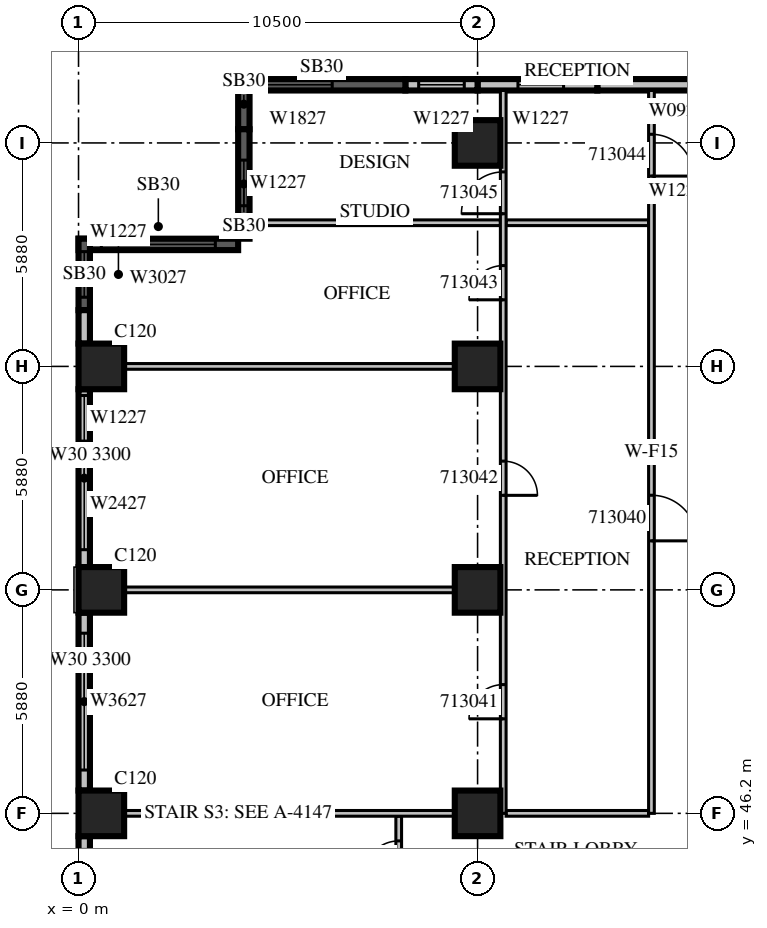
"""IFC4 building model, lengths in metres.
Left out: names, types, materials, properties, quantities, classifications, styles, units other than length and angle.
Written with IfcOpenShell. Run it as: python <this file> out.ifc"""

import sys

from ifc_helpers import new_model, si_unit, direction, frame, frame_2d, origin, origin_2d, place, context, subcontext, project, spatial, rectangle, extrude, source, transform, mapped, element, fill, save


model = new_model("IFC4")
c1 = context("Model", 3, precision=1e-05, world=origin(), true_north=direction((0.0, 1.0)))
c2 = subcontext(c1, "Body", "Model", "MODEL_VIEW")
j1 = project(units=[si_unit("LENGTHUNIT", "METRE"), si_unit("PLANEANGLEUNIT", "RADIAN")], contexts=[c1])
p1 = place(None, origin())
s1 = spatial("IfcSite", under=j1, at=p1, CompositionType="ELEMENT")
p2 = place(p1, origin())
s2 = spatial("IfcBuilding", under=s1, at=p2, CompositionType="ELEMENT")
p3 = place(p2, frame((0.0, 0.0, 65.7)))
s3 = spatial("IfcBuildingStorey", under=s2, at=p3, CompositionType="ELEMENT", Elevation=65.7)
m1 = source(origin(), c2, "Body", "SweptSolid", [
    extrude(rectangle(XDim=1.2, YDim=1.2, at=origin_2d()), origin(), (0.0, 0.0, 1.0), 4.2),
])
for number, where, z_axis, x_axis in (
    (1, (0.6, 46.2, 0.0), (0.0, 0.0, 1.0), (1.0, 0.0, 0.0)),
    (2, (10.5, 46.2, 0.0), (0.0, 0.0, 1.0), (1.0, 0.0, 0.0)),
    (3, (0.6, 52.08, 0.0), (0.0, 0.0, 1.0), (1.0, 0.0, 0.0)),
    (4, (10.5, 52.08, 0.0), (0.0, 0.0, 1.0), (1.0, 0.0, 0.0)),
    (5, (0.6, 57.96, 0.0), (0.0, 0.0, 1.0), (1.0, 0.0, 0.0)),
    (6, (10.5, 57.96, 0.0), (0.0, 0.0, 1.0), (1.0, 0.0, 0.0)),
    (7, (10.5, 63.84, 0.0), (0.0, 0.0, 1.0), (1.0, 0.0, 0.0)),
):
    element("IfcColumn", number, at=place(p3, frame(where, z_axis=z_axis, x_axis=x_axis)), inside=s3, PredefinedType="COLUMN", context=c2, shape_type="MappedRepresentation", body=[
        mapped(m1, transform((0.0, 0.0, 0.0), scale=1.0)),
    ])
m2 = source(origin(), c2, "Body", "SweptSolid", [
    extrude(rectangle(XDim=3.15, YDim=0.3, at=frame_2d((1.575, 0.0))), origin(), (0.0, 0.0, 1.0), 3.8),
])
p4 = place(p3, frame((16.8, 65.37, 0.0), z_axis=(0.0, 0.0, 1.0), x_axis=(-1.0, 0.0, 0.0)))
e8 = element("IfcWall", 8, at=p4, inside=s3, PredefinedType="STANDARD", context=c2, shape_type="MappedRepresentation", body=[
    mapped(m2, transform((0.0, 0.0, 0.0), scale=1.0)),
])
p5 = place(p3, frame((13.65, 65.37, 0.0), z_axis=(0.0, 0.0, 1.0), x_axis=(-1.0, 0.0, 0.0)))
e9 = element("IfcWall", 9, at=p5, inside=s3, PredefinedType="STANDARD", context=c2, shape_type="MappedRepresentation", body=[
    mapped(m2, transform((0.0, 0.0, 0.0), scale=1.0)),
])
m3 = source(origin(), c2, "Body", "SweptSolid", [
    extrude(rectangle(XDim=1.2, YDim=2.7, at=frame_2d((0.6, 1.35))), frame((0.0, 0.16, 0.0), z_axis=(0.0, -1.0, 0.0), x_axis=(1.0, 0.0, 0.0)), (0.0, 0.0, 1.0), 0.32),
])
p6 = place(p5, frame((0.887, 0.0, 0.6)))
e10 = element("IfcOpeningElement", 10, at=p6, cuts=e9, PredefinedType="OPENING", context=c2, shape_type="MappedRepresentation", body=[
    mapped(m3, transform((0.0, 0.0, 0.0), scale=1.0)),
])
p7 = place(p3, frame((10.5, 65.37, 0.0), z_axis=(0.0, 0.0, 1.0), x_axis=(-1.0, 0.0, 0.0)))
e11 = element("IfcWall", 11, at=p7, inside=s3, PredefinedType="STANDARD", context=c2, shape_type="SweptSolid", body=[
    extrude(rectangle(XDim=1.9, YDim=0.3, at=frame_2d((0.95, 0.0))), origin(), (0.0, 0.0, 1.0), 3.8),
])
p8 = place(p7, frame((0.35, 0.0, 0.6)))
e12 = element("IfcOpeningElement", 12, at=p8, cuts=e11, PredefinedType="OPENING", context=c2, shape_type="MappedRepresentation", body=[
    mapped(m3, transform((0.0, 0.0, 0.0), scale=1.0)),
])
p9 = place(p3, frame((8.6, 65.37, 0.0), z_axis=(0.0, 0.0, 1.0), x_axis=(-1.0, 0.0, 0.0)))
e13 = element("IfcWall", 13, at=p9, inside=s3, PredefinedType="SOLIDWALL", context=c2, shape_type="SweptSolid", body=[
    extrude(rectangle(XDim=4.4, YDim=0.3, at=frame_2d((2.2, 0.0))), origin(), (0.0, 0.0, 1.0), 3.8),
])
m4 = source(origin(), c2, "Body", "SweptSolid", [
    extrude(rectangle(XDim=1.8, YDim=2.7, at=frame_2d((0.9, 1.35))), frame((0.0, 0.16, 0.0), z_axis=(0.0, -1.0, 0.0), x_axis=(1.0, 0.0, 0.0)), (0.0, 0.0, 1.0), 0.32),
])
p10 = place(p9, frame((1.925, 0.0, 0.6)))
e14 = element("IfcOpeningElement", 14, at=p10, cuts=e13, PredefinedType="OPENING", context=c2, shape_type="MappedRepresentation", body=[
    mapped(m4, transform((0.0, 0.0, 0.0), scale=1.0)),
])
p11 = place(p3, frame((4.35, 65.52, 0.0), z_axis=(0.0, 0.0, 1.0), x_axis=(0.0, -1.0, 0.0)))
e15 = element("IfcWall", 15, at=p11, inside=s3, PredefinedType="SOLIDWALL", context=c2, shape_type="SweptSolid", body=[
    extrude(rectangle(XDim=1.32, YDim=0.3, at=frame_2d((0.66, 0.0))), origin(), (0.0, 0.0, 1.0), 3.8),
])
p12 = place(p3, frame((4.35, 64.2, 0.0), z_axis=(0.0, 0.0, 1.0), x_axis=(0.0, -1.0, 0.0)))
e16 = element("IfcWall", 16, at=p12, inside=s3, PredefinedType="SOLIDWALL", context=c2, shape_type="SweptSolid", body=[
    extrude(rectangle(XDim=2.88, YDim=0.3, at=frame_2d((1.44, 0.0))), origin(), (0.0, 0.0, 1.0), 3.8),
])
p13 = place(p12, frame((0.812, 0.0, 0.6)))
e17 = element("IfcOpeningElement", 17, at=p13, cuts=e16, PredefinedType="OPENING", context=c2, shape_type="MappedRepresentation", body=[
    mapped(m3, transform((0.0, 0.0, 0.0), scale=1.0)),
])
m5 = source(origin(), c2, "Body", "SweptSolid", [
    extrude(rectangle(XDim=4.2, YDim=0.3, at=frame_2d((2.1, 0.0))), origin(), (0.0, 0.0, 1.0), 3.8),
])
p14 = place(p3, frame((4.2, 61.17, 0.0), z_axis=(0.0, 0.0, 1.0), x_axis=(-1.0, 0.0, 0.0)))
e18 = element("IfcWall", 18, at=p14, inside=s3, PredefinedType="SOLIDWALL", context=c2, shape_type="MappedRepresentation", body=[
    mapped(m5, transform((0.0, 0.0, 0.0), scale=1.0)),
])
m6 = source(origin(), c2, "Body", "SweptSolid", [
    extrude(rectangle(XDim=3.0, YDim=2.7, at=frame_2d((1.5, 1.35))), frame((0.0, 0.16, 0.0), z_axis=(0.0, -1.0, 0.0), x_axis=(1.0, 0.0, 0.0)), (0.0, 0.0, 1.0), 0.32),
])
p15 = place(p14, frame((0.6, 0.0, 0.6)))
e19 = element("IfcOpeningElement", 19, at=p15, cuts=e18, PredefinedType="OPENING", context=c2, shape_type="MappedRepresentation", body=[
    mapped(m6, transform((0.0, 0.0, 0.0), scale=1.0)),
])
p16 = place(p3, frame((0.15, 61.32, 0.0), z_axis=(0.0, 0.0, 1.0), x_axis=(0.0, -1.0, 0.0)))
e20 = element("IfcWall", 20, at=p16, inside=s3, PredefinedType="SOLIDWALL", context=c2, shape_type="SweptSolid", body=[
    extrude(rectangle(XDim=1.88, YDim=0.3, at=frame_2d((0.94, 0.0))), origin(), (0.0, 0.0, 1.0), 3.8),
])
p17 = place(p16, frame((0.34, 0.0, 0.6)))
e21 = element("IfcOpeningElement", 21, at=p17, cuts=e20, PredefinedType="OPENING", context=c2, shape_type="MappedRepresentation", body=[
    mapped(m3, transform((0.0, 0.0, 0.0), scale=1.0)),
])
p18 = place(p3, frame((0.15, 59.44, 0.0), z_axis=(0.0, 0.0, 1.0), x_axis=(0.0, -1.0, 0.0)))
e22 = element("IfcWall", 22, at=p18, inside=s3, PredefinedType="STANDARD", context=c2, shape_type="SweptSolid", body=[
    extrude(rectangle(XDim=0.88, YDim=0.3, at=frame_2d((0.44, 0.0))), origin(), (0.0, 0.0, 1.0), 3.8),
])
m7 = source(origin(), c2, "Body", "SweptSolid", [
    extrude(rectangle(XDim=4.68, YDim=0.3, at=frame_2d((2.34, 0.0))), origin(), (0.0, 0.0, 1.0), 3.3),
])
p19 = place(p3, frame((0.15, 57.36, 0.0), z_axis=(0.0, 0.0, 1.0), x_axis=(0.0, -1.0, 0.0)))
e23 = element("IfcWall", 23, at=p19, inside=s3, PredefinedType="STANDARD", context=c2, shape_type="MappedRepresentation", body=[
    mapped(m7, transform((0.0, 0.0, 0.0), scale=1.0)),
])
p20 = place(p19, frame((0.165, 0.0, 0.6)))
e24 = element("IfcOpeningElement", 24, at=p20, cuts=e23, PredefinedType="OPENING", context=c2, shape_type="MappedRepresentation", body=[
    mapped(m3, transform((0.0, 0.0, 0.0), scale=1.0)),
])
m8 = source(origin(), c2, "Body", "SweptSolid", [
    extrude(rectangle(XDim=2.4, YDim=2.7, at=frame_2d((1.2, 1.35))), frame((0.0, 0.16, 0.0), z_axis=(0.0, -1.0, 0.0), x_axis=(1.0, 0.0, 0.0)), (0.0, 0.0, 1.0), 0.32),
])
p21 = place(p19, frame((1.823, 0.0, 0.6)))
e25 = element("IfcOpeningElement", 25, at=p21, cuts=e23, PredefinedType="OPENING", context=c2, shape_type="MappedRepresentation", body=[
    mapped(m8, transform((0.0, 0.0, 0.0), scale=1.0)),
])
p22 = place(p3, frame((0.15, 51.48, 0.0), z_axis=(0.0, 0.0, 1.0), x_axis=(0.0, -1.0, 0.0)))
e26 = element("IfcWall", 26, at=p22, inside=s3, PredefinedType="STANDARD", context=c2, shape_type="MappedRepresentation", body=[
    mapped(m7, transform((0.0, 0.0, 0.0), scale=1.0)),
])
m9 = source(origin(), c2, "Body", "SweptSolid", [
    extrude(rectangle(XDim=3.6, YDim=2.7, at=frame_2d((1.8, 1.35))), frame((0.0, 0.16, 0.0), z_axis=(0.0, -1.0, 0.0), x_axis=(1.0, 0.0, 0.0)), (0.0, 0.0, 1.0), 0.32),
])
p23 = place(p22, frame((0.54, 0.0, 0.6)))
e27 = element("IfcOpeningElement", 27, at=p23, cuts=e26, PredefinedType="OPENING", context=c2, shape_type="MappedRepresentation", body=[
    mapped(m9, transform((0.0, 0.0, 0.0), scale=1.0)),
])
m10 = source(origin(), c2, "Body", "SweptSolid", [
    extrude(rectangle(XDim=1.6, YDim=0.3, at=frame_2d((0.8, 0.0))), origin(), (0.0, 0.0, 1.0), 3.8),
])
p24 = place(p3, frame((0.15, 45.6, 0.0), z_axis=(0.0, 0.0, 1.0), x_axis=(0.0, -1.0, 0.0)))
e28 = element("IfcWall", 28, at=p24, inside=s3, PredefinedType="STANDARD", context=c2, shape_type="MappedRepresentation", body=[
    mapped(m10, transform((0.0, 0.0, 0.0), scale=1.0)),
])
m11 = source(origin(), c2, "Body", "SweptSolid", [
    extrude(rectangle(XDim=0.9, YDim=2.7, at=frame_2d((0.45, 1.35))), frame((0.0, 0.16, 0.0), z_axis=(0.0, -1.0, 0.0), x_axis=(1.0, 0.0, 0.0)), (0.0, 0.0, 1.0), 0.32),
])
p25 = place(p24, frame((0.35, 0.0, 0.6)))
e29 = element("IfcOpeningElement", 29, at=p25, cuts=e28, PredefinedType="OPENING", context=c2, shape_type="MappedRepresentation", body=[
    mapped(m11, transform((0.0, 0.0, 0.0), scale=1.0)),
])
m12 = source(origin(), c2, "Body", "SweptSolid", [
    extrude(rectangle(XDim=2.2, YDim=0.15, at=frame_2d((1.1, 0.0))), origin(), (0.0, 0.0, 1.0), 3.8),
])
p26 = place(p3, frame((8.425, 43.925, 0.0), z_axis=(0.0, 0.0, 1.0), x_axis=(0.0, 1.0, 0.0)))
e30 = element("IfcWall", 30, at=p26, inside=s3, PredefinedType="PARTITIONING", context=c2, shape_type="MappedRepresentation", body=[
    mapped(m12, transform((0.0, 0.0, 0.0), scale=1.0)),
])
m13 = source(origin(), c2, "Body", "SweptSolid", [
    extrude(rectangle(XDim=0.9, YDim=2.1, at=frame_2d((0.45, 1.05))), frame((0.0, 0.085, 0.0), z_axis=(0.0, -1.0, 0.0), x_axis=(1.0, 0.0, 0.0)), (0.0, 0.0, 1.0), 0.17),
])
p27 = place(p26, frame((0.65, 0.0, 0.0)))
e31 = element("IfcOpeningElement", 31, at=p27, cuts=e30, PredefinedType="OPENING", context=c2, shape_type="MappedRepresentation", body=[
    mapped(m13, transform((0.0, 0.0, 0.0), scale=1.0)),
])
m14 = source(origin(), c2, "Body", "SweptSolid", [
    extrude(rectangle(XDim=8.702, YDim=0.15, at=frame_2d((4.351, 0.0))), origin(), (0.0, 0.0, 1.0), 3.8),
])
for number, where, z_axis, x_axis in (
    (32, (9.901, 52.08, 0.0), (0.0, 0.0, 1.0), (-1.0, 0.0, 0.0)),
    (33, (9.901, 57.96, 0.0), (0.0, 0.0, 1.0), (-1.0, 0.0, 0.0)),
    (34, (9.901, 46.2, 0.0), (0.0, 0.0, 1.0), (-1.0, 0.0, 0.0)),
):
    element("IfcWall", number, at=place(p3, frame(where, z_axis=z_axis, x_axis=x_axis)), inside=s3, PredefinedType="PARTITIONING", context=c2, shape_type="MappedRepresentation", body=[
        mapped(m14, transform((0.0, 0.0, 0.0), scale=1.0)),
    ])
m15 = source(origin(), c2, "Body", "SweptSolid", [
    extrude(rectangle(XDim=3.75, YDim=0.15, at=frame_2d((1.875, 0.0))), origin(), (0.0, 0.0, 1.0), 3.8),
])
p28 = place(p3, frame((15.0, 46.2, 0.0), z_axis=(0.0, 0.0, 1.0), x_axis=(-1.0, 0.0, 0.0)))
e35 = element("IfcWall", 35, at=p28, inside=s3, PredefinedType="PARTITIONING", context=c2, shape_type="MappedRepresentation", body=[
    mapped(m15, transform((0.0, 0.0, 0.0), scale=1.0)),
])
m16 = source(origin(), c2, "Body", "SweptSolid", [
    extrude(rectangle(XDim=6.695, YDim=0.15, at=frame_2d((3.348, 0.0))), origin(), (0.0, 0.0, 1.0), 3.8),
])
p29 = place(p3, frame((11.1, 61.74, 0.0), z_axis=(0.0, 0.0, 1.0), x_axis=(-1.0, 0.0, 0.0)))
e36 = element("IfcWall", 36, at=p29, inside=s3, PredefinedType="PARTITIONING", context=c2, shape_type="MappedRepresentation", body=[
    mapped(m16, transform((0.0, 0.0, 0.0), scale=1.0)),
])
p30 = place(p3, frame((15.0, 61.74, 0.0), z_axis=(0.0, 0.0, 1.0), x_axis=(-1.0, 0.0, 0.0)))
e37 = element("IfcWall", 37, at=p30, inside=s3, PredefinedType="PARTITIONING", context=c2, shape_type="MappedRepresentation", body=[
    mapped(m15, transform((0.0, 0.0, 0.0), scale=1.0)),
])
m17 = source(origin(), c2, "Body", "SweptSolid", [
    extrude(rectangle(XDim=19.02, YDim=0.15, at=frame_2d((9.51, 0.0))), origin(), (0.0, 0.0, 1.0), 3.8),
])
p31 = place(p3, frame((11.175, 46.2, 0.0), z_axis=(0.0, 0.0, 1.0), x_axis=(0.0, 1.0, 0.0)))
e38 = element("IfcWall", 38, at=p31, inside=s3, PredefinedType="PARTITIONING", context=c2, shape_type="MappedRepresentation", body=[
    mapped(m17, transform((0.0, 0.0, 0.0), scale=1.0)),
])
p32 = place(p31, frame((2.487, 0.0, 0.0)))
e39 = element("IfcOpeningElement", 39, at=p32, cuts=e38, PredefinedType="OPENING", context=c2, shape_type="MappedRepresentation", body=[
    mapped(m13, transform((0.0, 0.0, 0.0), scale=1.0)),
])
p33 = place(p31, frame((8.367, 0.0, 0.0)))
e40 = element("IfcOpeningElement", 40, at=p33, cuts=e38, PredefinedType="OPENING", context=c2, shape_type="MappedRepresentation", body=[
    mapped(m13, transform((0.0, 0.0, 0.0), scale=1.0)),
])
p34 = place(p31, frame((13.512, 0.0, 0.0)))
e41 = element("IfcOpeningElement", 41, at=p34, cuts=e38, PredefinedType="OPENING", context=c2, shape_type="MappedRepresentation", body=[
    mapped(m13, transform((0.0, 0.0, 0.0), scale=1.0)),
])
m18 = source(origin(), c2, "Body", "SweptSolid", [
    extrude(rectangle(XDim=1.1, YDim=2.1, at=frame_2d((0.55, 1.05))), frame((0.0, 0.085, 0.0), z_axis=(0.0, -1.0, 0.0), x_axis=(1.0, 0.0, 0.0)), (0.0, 0.0, 1.0), 0.17),
])
p35 = place(p31, frame((15.777, 0.0, 0.0)))
e42 = element("IfcOpeningElement", 42, at=p35, cuts=e38, PredefinedType="OPENING", context=c2, shape_type="MappedRepresentation", body=[
    mapped(m18, transform((0.0, 0.0, 0.0), scale=1.0)),
])
p36 = place(p3, frame((15.075, 46.2, 0.0), z_axis=(0.0, 0.0, 1.0), x_axis=(0.0, 1.0, 0.0)))
e43 = element("IfcWall", 43, at=p36, inside=s3, PredefinedType="PARTITIONING", context=c2, shape_type="MappedRepresentation", body=[
    mapped(m17, transform((0.0, 0.0, 0.0), scale=1.0)),
])
m19 = source(origin(), c2, "Body", "SweptSolid", [
    extrude(rectangle(XDim=1.2, YDim=2.1, at=frame_2d((0.6, 1.05))), frame((0.0, 0.085, 0.0), z_axis=(0.0, -1.0, 0.0), x_axis=(1.0, 0.0, 0.0)), (0.0, 0.0, 1.0), 0.17),
])
p37 = place(p36, frame((7.17, 0.0, 0.0)))
e44 = element("IfcOpeningElement", 44, at=p37, cuts=e43, PredefinedType="OPENING", context=c2, shape_type="MappedRepresentation", body=[
    mapped(m19, transform((0.0, 0.0, 0.0), scale=1.0)),
])
p38 = place(p36, frame((16.767, 0.0, 0.0)))
e45 = element("IfcOpeningElement", 45, at=p38, cuts=e43, PredefinedType="OPENING", context=c2, shape_type="MappedRepresentation", body=[
    mapped(m18, transform((0.0, 0.0, 0.0), scale=1.0)),
])
m20 = source(origin(), c2, "Body", "SweptSolid", [
    extrude(rectangle(XDim=1.2, YDim=2.7, at=frame_2d((0.6, 1.35))), frame((0.0, 0.03, 0.0), z_axis=(0.0, -1.0, 0.0), x_axis=(1.0, 0.0, 0.0)), (0.0, 0.0, 1.0), 0.06),
])
p39 = place(p6, origin())
e46 = element("IfcWindow", 46, at=p39, inside=s3, PartitioningType="SINGLE_PANEL", PredefinedType="WINDOW", context=c2, shape_type="MappedRepresentation", body=[
    mapped(m20, transform((0.0, 0.0, 0.0), scale=1.0)),
])
fill(e10, e46)
m21 = source(origin(), c2, "Body", "SweptSolid", [
    extrude(rectangle(XDim=1.8, YDim=2.7, at=frame_2d((0.9, 1.35))), frame((0.0, 0.03, 0.0), z_axis=(0.0, -1.0, 0.0), x_axis=(1.0, 0.0, 0.0)), (0.0, 0.0, 1.0), 0.06),
])
p40 = place(p10, origin())
e47 = element("IfcWindow", 47, at=p40, inside=s3, PartitioningType="SINGLE_PANEL", PredefinedType="WINDOW", context=c2, shape_type="MappedRepresentation", body=[
    mapped(m21, transform((0.0, 0.0, 0.0), scale=1.0)),
])
fill(e14, e47)
p41 = place(p8, origin())
e48 = element("IfcWindow", 48, at=p41, inside=s3, PartitioningType="SINGLE_PANEL", PredefinedType="WINDOW", context=c2, shape_type="MappedRepresentation", body=[
    mapped(m20, transform((0.0, 0.0, 0.0), scale=1.0)),
])
fill(e12, e48)
p42 = place(p13, origin())
e49 = element("IfcWindow", 49, at=p42, inside=s3, PartitioningType="SINGLE_PANEL", PredefinedType="WINDOW", context=c2, shape_type="MappedRepresentation", body=[
    mapped(m20, transform((0.0, 0.0, 0.0), scale=1.0)),
])
fill(e17, e49)
m22 = source(origin(), c2, "Body", "SweptSolid", [
    extrude(rectangle(XDim=3.0, YDim=2.7, at=frame_2d((1.5, 1.35))), frame((0.0, 0.03, 0.0), z_axis=(0.0, -1.0, 0.0), x_axis=(1.0, 0.0, 0.0)), (0.0, 0.0, 1.0), 0.06),
])
p43 = place(p15, origin())
e50 = element("IfcWindow", 50, at=p43, inside=s3, PartitioningType="SINGLE_PANEL", PredefinedType="WINDOW", context=c2, shape_type="MappedRepresentation", body=[
    mapped(m22, transform((0.0, 0.0, 0.0), scale=1.0)),
])
fill(e19, e50)
p44 = place(p20, origin())
e51 = element("IfcWindow", 51, at=p44, inside=s3, PartitioningType="SINGLE_PANEL", PredefinedType="WINDOW", context=c2, shape_type="MappedRepresentation", body=[
    mapped(m20, transform((0.0, 0.0, 0.0), scale=1.0)),
])
fill(e24, e51)
m23 = source(origin(), c2, "Body", "SweptSolid", [
    extrude(rectangle(XDim=2.4, YDim=2.7, at=frame_2d((1.2, 1.35))), frame((0.0, 0.03, 0.0), z_axis=(0.0, -1.0, 0.0), x_axis=(1.0, 0.0, 0.0)), (0.0, 0.0, 1.0), 0.06),
])
p45 = place(p21, origin())
e52 = element("IfcWindow", 52, at=p45, inside=s3, PartitioningType="SINGLE_PANEL", PredefinedType="WINDOW", context=c2, shape_type="MappedRepresentation", body=[
    mapped(m23, transform((0.0, 0.0, 0.0), scale=1.0)),
])
fill(e25, e52)
p46 = place(p17, origin())
e53 = element("IfcWindow", 53, at=p46, inside=s3, PartitioningType="SINGLE_PANEL", PredefinedType="WINDOW", context=c2, shape_type="MappedRepresentation", body=[
    mapped(m20, transform((0.0, 0.0, 0.0), scale=1.0)),
])
fill(e21, e53)
m24 = source(origin(), c2, "Body", "SweptSolid", [
    extrude(rectangle(XDim=3.6, YDim=2.7, at=frame_2d((1.8, 1.35))), frame((0.0, 0.03, 0.0), z_axis=(0.0, -1.0, 0.0), x_axis=(1.0, 0.0, 0.0)), (0.0, 0.0, 1.0), 0.06),
])
p47 = place(p23, origin())
e54 = element("IfcWindow", 54, at=p47, inside=s3, PartitioningType="SINGLE_PANEL", PredefinedType="WINDOW", context=c2, shape_type="MappedRepresentation", body=[
    mapped(m24, transform((0.0, 0.0, 0.0), scale=1.0)),
])
fill(e27, e54)
m25 = source(origin(), c2, "Body", "SweptSolid", [
    extrude(rectangle(XDim=0.9, YDim=2.1, at=frame_2d((0.45, 1.05))), frame((0.0, 0.025, 0.0), z_axis=(0.0, -1.0, 0.0), x_axis=(1.0, 0.0, 0.0)), (0.0, 0.0, 1.0), 0.05),
])
p48 = place(p27, origin())
e55 = element("IfcDoor", 55, at=p48, inside=s3, OperationType="SINGLE_SWING_LEFT", PredefinedType="DOOR", context=c2, shape_type="MappedRepresentation", body=[
    mapped(m25, transform((0.0, 0.0, 0.0), scale=1.0)),
])
fill(e31, e55)
m26 = source(origin(), c2, "Body", "SweptSolid", [
    extrude(rectangle(XDim=1.2, YDim=2.1, at=frame_2d((0.6, 1.05))), frame((0.0, 0.025, 0.0), z_axis=(0.0, -1.0, 0.0), x_axis=(1.0, 0.0, 0.0)), (0.0, 0.0, 1.0), 0.05),
])
p49 = place(p37, origin())
e56 = element("IfcDoor", 56, at=p49, inside=s3, OperationType="SINGLE_SWING_RIGHT", PredefinedType="DOOR", context=c2, shape_type="MappedRepresentation", body=[
    mapped(m26, transform((0.0, 0.0, 0.0), scale=1.0)),
])
fill(e44, e56)
p50 = place(p32, origin())
e57 = element("IfcDoor", 57, at=p50, inside=s3, OperationType="SINGLE_SWING_LEFT", PredefinedType="DOOR", context=c2, shape_type="MappedRepresentation", body=[
    mapped(m25, transform((0.0, 0.0, 0.0), scale=1.0)),
])
fill(e39, e57)
p51 = place(p33, origin())
e58 = element("IfcDoor", 58, at=p51, inside=s3, OperationType="SINGLE_SWING_RIGHT", PredefinedType="DOOR", context=c2, shape_type="MappedRepresentation", body=[
    mapped(m25, transform((0.0, 0.0, 0.0), scale=1.0)),
])
fill(e40, e58)
p52 = place(p34, origin())
e59 = element("IfcDoor", 59, at=p52, inside=s3, OperationType="SINGLE_SWING_LEFT", PredefinedType="DOOR", context=c2, shape_type="MappedRepresentation", body=[
    mapped(m25, transform((0.0, 0.0, 0.0), scale=1.0)),
])
fill(e41, e59)
m27 = source(origin(), c2, "Body", "SweptSolid", [
    extrude(rectangle(XDim=1.1, YDim=2.1, at=frame_2d((0.55, 1.05))), frame((0.0, 0.025, 0.0), z_axis=(0.0, -1.0, 0.0), x_axis=(1.0, 0.0, 0.0)), (0.0, 0.0, 1.0), 0.05),
])
p53 = place(p38, origin())
e60 = element("IfcDoor", 60, at=p53, inside=s3, OperationType="SINGLE_SWING_RIGHT", PredefinedType="DOOR", context=c2, shape_type="MappedRepresentation", body=[
    mapped(m27, transform((0.0, 0.0, 0.0), scale=1.0)),
])
fill(e45, e60)
p54 = place(p35, origin())
e61 = element("IfcDoor", 61, at=p54, inside=s3, OperationType="SINGLE_SWING_LEFT", PredefinedType="DOOR", context=c2, shape_type="MappedRepresentation", body=[
    mapped(m27, transform((0.0, 0.0, 0.0), scale=1.0)),
])
fill(e42, e61)
save(model, sys.argv[1])
